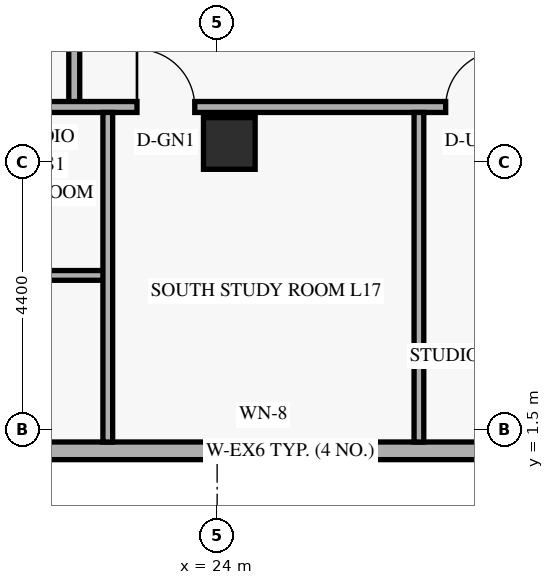
"""IFC4 building model, lengths in metres.
Left out: names, types, materials, properties, quantities, classifications, styles, units other than length and angle.
Written with IfcOpenShell. Run it as: python <this file> out.ifc"""

import sys

from ifc_helpers import new_model, si_unit, direction, frame, frame_2d, origin, origin_2d, place, context, subcontext, project, spatial, rectangle, extrude, element, fill, save


model = new_model("IFC4")
c1 = context("Model", 3, precision=1e-05, world=origin(), true_north=direction((0.0, 1.0)))
c2 = subcontext(c1, "Body", "Model", "MODEL_VIEW")
j1 = project(units=[si_unit("LENGTHUNIT", "METRE"), si_unit("PLANEANGLEUNIT", "RADIAN")], contexts=[c1])
p1 = place(None, origin())
s1 = spatial("IfcSite", under=j1, at=p1, CompositionType="ELEMENT")
p2 = place(p1, origin())
s2 = spatial("IfcBuilding", under=s1, at=p2, CompositionType="ELEMENT")
p3 = place(p2, frame((0.0, 0.0, 67.8)))
s3 = spatial("IfcBuildingStorey", under=s2, at=p3, CompositionType="ELEMENT", Elevation=67.8)
p4 = place(p3, frame((24.2, 6.2, 0.0), z_axis=(0.0, 0.0, 1.0), x_axis=(1.0, 0.0, 0.0)))
e1 = element("IfcColumn", 1, at=p4, inside=s3, PredefinedType="COLUMN", context=c2, shape_type="SweptSolid", body=[
    extrude(rectangle(XDim=0.85, YDim=0.85, at=origin_2d()), origin(), (0.0, 0.0, 1.0), 3.6),
])
p5 = place(p3, frame((5.42, 1.145, 0.0), z_axis=(0.0, 0.0, 1.0), x_axis=(1.0, 0.0, 0.0)))
e2 = element("IfcWall", 2, at=p5, inside=s3, PredefinedType="SOLIDWALL", context=c2, shape_type="SweptSolid", body=[
    extrude(rectangle(XDim=39.56, YDim=0.29, at=frame_2d((19.78, 0.0))), origin(), (0.0, 0.0, 1.0), 3.3),
])
p6 = place(p5, frame((2.765, 0.0, 0.85)))
e3 = element("IfcOpeningElement", 3, at=p6, cuts=e2, PredefinedType="OPENING", context=c2, shape_type="SweptSolid", body=[
    extrude(rectangle(XDim=1.35, YDim=1.55, at=frame_2d((0.675, 0.775))), frame((0.0, 0.155, 0.0), z_axis=(0.0, -1.0, 0.0), x_axis=(1.0, 0.0, 0.0)), (0.0, 0.0, 1.0), 0.31),
])
p7 = place(p5, frame((7.18, 0.0, 0.85)))
e4 = element("IfcOpeningElement", 4, at=p7, cuts=e2, PredefinedType="OPENING", context=c2, shape_type="SweptSolid", body=[
    extrude(rectangle(XDim=1.2, YDim=1.5, at=frame_2d((0.6, 0.75))), frame((0.0, 0.155, 0.0), z_axis=(0.0, -1.0, 0.0), x_axis=(1.0, 0.0, 0.0)), (0.0, 0.0, 1.0), 0.31),
])
p8 = place(p5, frame((12.056, 0.0, 0.85)))
e5 = element("IfcOpeningElement", 5, at=p8, cuts=e2, PredefinedType="OPENING", context=c2, shape_type="SweptSolid", body=[
    extrude(rectangle(XDim=1.35, YDim=1.55, at=frame_2d((0.675, 0.775))), frame((0.0, 0.155, 0.0), z_axis=(0.0, -1.0, 0.0), x_axis=(1.0, 0.0, 0.0)), (0.0, 0.0, 1.0), 0.31),
])
p9 = place(p5, frame((18.665, 0.0, 0.85)))
e6 = element("IfcOpeningElement", 6, at=p9, cuts=e2, PredefinedType="OPENING", context=c2, shape_type="SweptSolid", body=[
    extrude(rectangle(XDim=1.35, YDim=1.55, at=frame_2d((0.675, 0.775))), frame((0.0, 0.155, 0.0), z_axis=(0.0, -1.0, 0.0), x_axis=(1.0, 0.0, 0.0)), (0.0, 0.0, 1.0), 0.31),
])
p10 = place(p5, frame((25.274, 0.0, 0.85)))
e7 = element("IfcOpeningElement", 7, at=p10, cuts=e2, PredefinedType="OPENING", context=c2, shape_type="SweptSolid", body=[
    extrude(rectangle(XDim=1.35, YDim=1.55, at=frame_2d((0.675, 0.775))), frame((0.0, 0.155, 0.0), z_axis=(0.0, -1.0, 0.0), x_axis=(1.0, 0.0, 0.0)), (0.0, 0.0, 1.0), 0.31),
])
p11 = place(p5, frame((30.39, 0.0, 0.85)))
e8 = element("IfcOpeningElement", 8, at=p11, cuts=e2, PredefinedType="OPENING", context=c2, shape_type="SweptSolid", body=[
    extrude(rectangle(XDim=1.35, YDim=1.55, at=frame_2d((0.675, 0.775))), frame((0.0, 0.155, 0.0), z_axis=(0.0, -1.0, 0.0), x_axis=(1.0, 0.0, 0.0)), (0.0, 0.0, 1.0), 0.31),
])
p12 = place(p5, frame((35.17, 0.0, 0.85)))
e9 = element("IfcOpeningElement", 9, at=p12, cuts=e2, PredefinedType="OPENING", context=c2, shape_type="SweptSolid", body=[
    extrude(rectangle(XDim=1.35, YDim=1.55, at=frame_2d((0.675, 0.775))), frame((0.0, 0.155, 0.0), z_axis=(0.0, -1.0, 0.0), x_axis=(1.0, 0.0, 0.0)), (0.0, 0.0, 1.0), 0.31),
])
p13 = place(p3, frame((21.65, 6.8, 0.0), z_axis=(0.0, 0.0, 1.0), x_axis=(0.0, 1.0, 0.0)))
e10 = element("IfcWall", 10, at=p13, inside=s3, PredefinedType="STANDARD", context=c2, shape_type="SweptSolid", body=[
    extrude(rectangle(XDim=34.4, YDim=0.18, at=frame_2d((17.2, 0.0))), origin(), (0.0, 0.0, 1.0), 2.589),
])
p14 = place(p3, frame((14.1, 6.8, 0.0), z_axis=(0.0, 0.0, 1.0), x_axis=(1.0, 0.0, 0.0)))
e11 = element("IfcWall", 11, at=p14, inside=s3, PredefinedType="STANDARD", context=c2, shape_type="SweptSolid", body=[
    extrude(rectangle(XDim=21.32, YDim=0.18, at=frame_2d((10.66, 0.0))), origin(), (0.0, 0.0, 1.0), 2.589),
])
p15 = place(p14, frame((0.44, 0.0, 0.0)))
e12 = element("IfcOpeningElement", 12, at=p15, cuts=e11, PredefinedType="OPENING", context=c2, shape_type="SweptSolid", body=[
    extrude(rectangle(XDim=0.92, YDim=2.15, at=frame_2d((0.46, 1.075))), frame((0.0, 0.1, 0.0), z_axis=(0.0, -1.0, 0.0), x_axis=(1.0, 0.0, 0.0)), (0.0, 0.0, 1.0), 0.2),
])
p16 = place(p14, frame((8.582, 0.0, 0.0)))
e13 = element("IfcOpeningElement", 13, at=p16, cuts=e11, PredefinedType="OPENING", context=c2, shape_type="SweptSolid", body=[
    extrude(rectangle(XDim=0.95, YDim=2.15, at=frame_2d((0.475, 1.075))), frame((0.0, 0.1, 0.0), z_axis=(0.0, -1.0, 0.0), x_axis=(1.0, 0.0, 0.0)), (0.0, 0.0, 1.0), 0.2),
])
p17 = place(p14, frame((13.658, 0.0, 0.0)))
e14 = element("IfcOpeningElement", 14, at=p17, cuts=e11, PredefinedType="OPENING", context=c2, shape_type="SweptSolid", body=[
    extrude(rectangle(XDim=0.92, YDim=2.15, at=frame_2d((0.46, 1.075))), frame((0.0, 0.1, 0.0), z_axis=(0.0, -1.0, 0.0), x_axis=(1.0, 0.0, 0.0)), (0.0, 0.0, 1.0), 0.2),
])
p18 = place(p3, frame((17.531, 4.03, 0.0), z_axis=(0.0, 0.0, 1.0), x_axis=(1.0, 0.0, 0.0)))
e15 = element("IfcWall", 15, at=p18, inside=s3, PredefinedType="PLUMBINGWALL", context=c2, shape_type="SweptSolid", body=[
    extrude(rectangle(XDim=4.67, YDim=0.16, at=frame_2d((2.335, 0.0))), origin(), (0.0, 0.0, 1.0), 3.3),
])
p19 = place(p18, frame((0.35, 0.0, 0.0)))
e16 = element("IfcOpeningElement", 16, at=p19, cuts=e15, PredefinedType="OPENING", context=c2, shape_type="SweptSolid", body=[
    extrude(rectangle(XDim=0.88, YDim=2.12, at=frame_2d((0.44, 1.06))), frame((0.0, 0.09, 0.0), z_axis=(0.0, -1.0, 0.0), x_axis=(1.0, 0.0, 0.0)), (0.0, 0.0, 1.0), 0.18),
])
p20 = place(p18, frame((2.72, 0.0, 0.0)))
e17 = element("IfcOpeningElement", 17, at=p20, cuts=e15, PredefinedType="OPENING", context=c2, shape_type="SweptSolid", body=[
    extrude(rectangle(XDim=0.86, YDim=2.12, at=frame_2d((0.43, 1.06))), frame((0.0, 0.09, 0.0), z_axis=(0.0, -1.0, 0.0), x_axis=(1.0, 0.0, 0.0)), (0.0, 0.0, 1.0), 0.18),
])
for number, where, z_axis, x_axis in (
    (18, (22.202, 1.29, 0.0), (0.0, 0.0, 1.0), (0.0, 1.0, 0.0)),
    (19, (27.318, 1.29, 0.0), (0.0, 0.0, 1.0), (0.0, 1.0, 0.0)),
):
    element("IfcWall", number, at=place(p3, frame(where, z_axis=z_axis, x_axis=x_axis)), inside=s3, PredefinedType="PARTITIONING", context=c2, shape_type="SweptSolid", body=[
        extrude(rectangle(XDim=5.42, YDim=0.16, at=frame_2d((2.71, 0.0))), origin(), (0.0, 0.0, 1.0), 2.749),
    ])
p21 = place(p9, origin())
e20 = element("IfcWindow", 20, at=p21, inside=s3, PartitioningType="SINGLE_PANEL", PredefinedType="WINDOW", context=c2, shape_type="SweptSolid", body=[
    extrude(rectangle(XDim=1.35, YDim=1.55, at=frame_2d((0.675, 0.775))), frame((0.0, 0.03, 0.0), z_axis=(0.0, -1.0, 0.0), x_axis=(1.0, 0.0, 0.0)), (0.0, 0.0, 1.0), 0.06),
])
fill(e6, e20)
p22 = place(p16, origin())
e21 = element("IfcDoor", 21, at=p22, inside=s3, OperationType="SINGLE_SWING_LEFT", PredefinedType="DOOR", context=c2, shape_type="SweptSolid", body=[
    extrude(rectangle(XDim=0.95, YDim=2.15, at=frame_2d((0.475, 1.075))), frame((0.0, 0.025, 0.0), z_axis=(0.0, -1.0, 0.0), x_axis=(1.0, 0.0, 0.0)), (0.0, 0.0, 1.0), 0.05),
])
fill(e13, e21)
p23 = place(p17, origin())
e22 = element("IfcDoor", 22, at=p23, inside=s3, OperationType="SINGLE_SWING_RIGHT", PredefinedType="DOOR", context=c2, shape_type="SweptSolid", body=[
    extrude(rectangle(XDim=0.92, YDim=2.15, at=frame_2d((0.46, 1.075))), frame((0.0, 0.025, 0.0), z_axis=(0.0, -1.0, 0.0), x_axis=(1.0, 0.0, 0.0)), (0.0, 0.0, 1.0), 0.05),
])
fill(e14, e22)
save(model, sys.argv[1])
